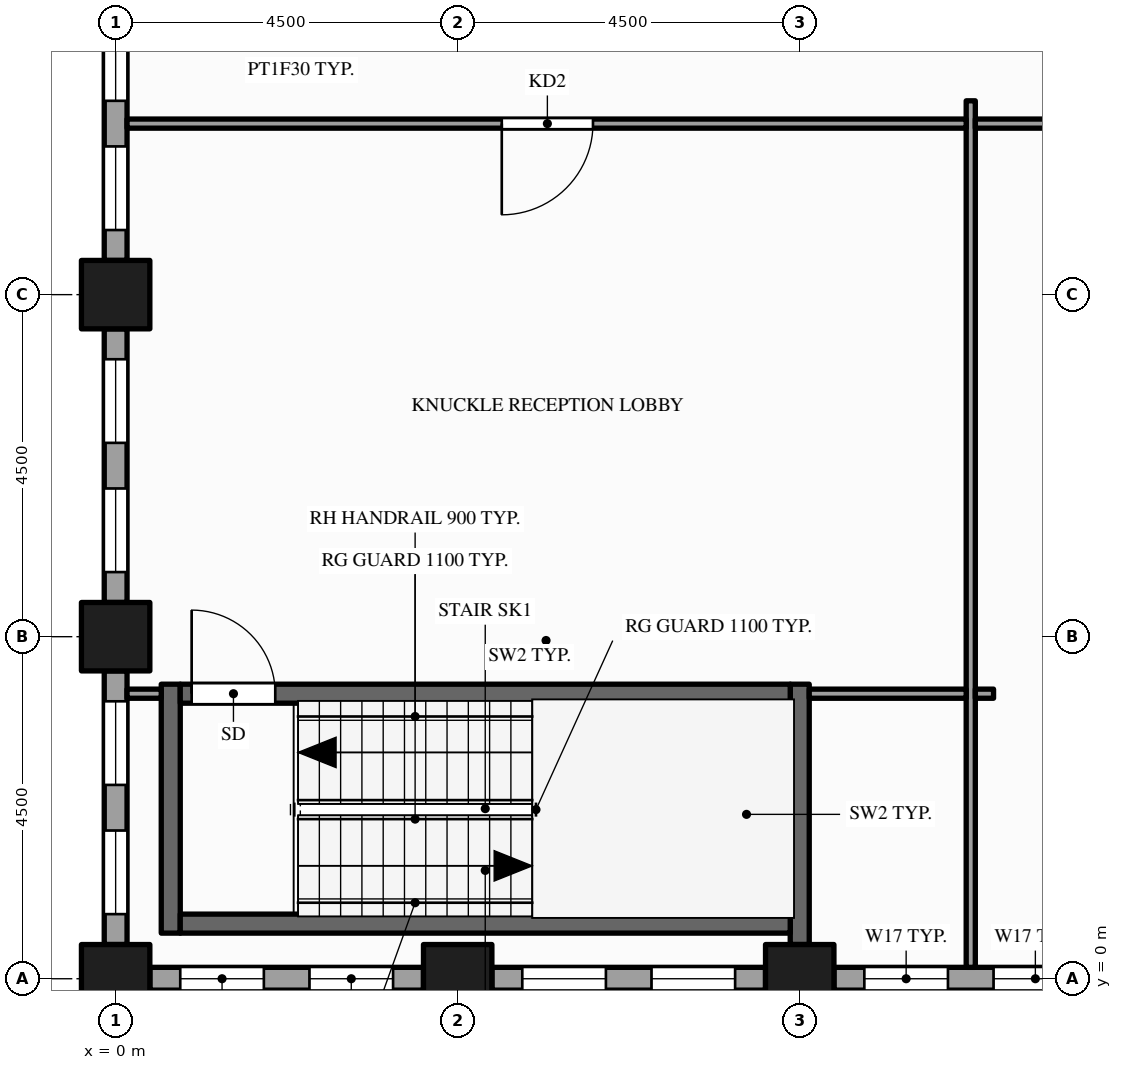
"""IFC4 building model, lengths in metres.
Left out: names, types, materials, properties, quantities, classifications, styles, units other than length and angle.
Written with IfcOpenShell. Run it as: python <this file> out.ifc"""

import sys

from ifc_helpers import new_model, si_unit, direction, frame, frame_2d, origin, origin_2d, place, context, subcontext, project, spatial, rectangle, hollow_rectangle, extrude, element, fill, save


model = new_model("IFC4")
c1 = context("Model", 3, precision=1e-05, world=origin(), true_north=direction((0.0, 1.0)))
c2 = subcontext(c1, "Body", "Model", "MODEL_VIEW")
j1 = project(units=[si_unit("LENGTHUNIT", "METRE"), si_unit("PLANEANGLEUNIT", "RADIAN")], contexts=[c1])
p1 = place(None, origin())
s1 = spatial("IfcSite", under=j1, at=p1, CompositionType="ELEMENT")
p2 = place(p1, origin())
s2 = spatial("IfcBuilding", under=s1, at=p2, CompositionType="ELEMENT")
p3 = place(p2, frame((0.0, 0.0, 171.0)))
s3 = spatial("IfcBuildingStorey", under=s2, at=p3, CompositionType="ELEMENT", Elevation=171.0)
for number, where, z_axis, x_axis in (
    (1, (0.0, 0.0, -0.15), (0.0, 0.0, 1.0), (1.0, 0.0, 0.0)),
    (2, (0.0, 4.5, -0.15), (0.0, 0.0, 1.0), (1.0, 0.0, 0.0)),
    (3, (0.0, 9.0, -0.15), (0.0, 0.0, 1.0), (1.0, 0.0, 0.0)),
    (4, (4.5, 0.0, -0.15), (0.0, 0.0, 1.0), (1.0, 0.0, 0.0)),
    (5, (9.0, 0.0, -0.15), (0.0, 0.0, 1.0), (1.0, 0.0, 0.0)),
):
    element("IfcColumn", number, at=place(p3, frame(where, z_axis=z_axis, x_axis=x_axis)), inside=s3, PredefinedType="COLUMN", context=c2, shape_type="SweptSolid", body=[
        extrude(hollow_rectangle(XDim=0.9, YDim=0.9, WallThickness=0.045, at=origin_2d()), origin(), (0.0, 0.0, 1.0), 4.0),
    ])
p4 = place(p3, frame((0.45, 0.0, 0.0), z_axis=(0.0, 0.0, 1.0), x_axis=(1.0, 0.0, 0.0)))
e6 = element("IfcWall", 6, at=p4, inside=s3, PredefinedType="STANDARD", context=c2, shape_type="SweptSolid", body=[
    extrude(rectangle(XDim=3.6, YDim=0.3, at=frame_2d((1.8, 0.0))), origin(), (0.0, 0.0, 1.0), 3.149),
])
p5 = place(p4, frame((0.4, 0.0, 0.9)))
e7 = element("IfcOpeningElement", 7, at=p5, cuts=e6, PredefinedType="OPENING", context=c2, shape_type="SweptSolid", body=[
    extrude(rectangle(XDim=1.1, YDim=2.0, at=frame_2d((0.55, 1.0))), frame((0.0, 0.16, 0.0), z_axis=(0.0, -1.0, 0.0), x_axis=(1.0, 0.0, 0.0)), (0.0, 0.0, 1.0), 0.32),
])
p6 = place(p4, frame((2.1, 0.0, 0.9)))
e8 = element("IfcOpeningElement", 8, at=p6, cuts=e6, PredefinedType="OPENING", context=c2, shape_type="SweptSolid", body=[
    extrude(rectangle(XDim=1.1, YDim=2.0, at=frame_2d((0.55, 1.0))), frame((0.0, 0.16, 0.0), z_axis=(0.0, -1.0, 0.0), x_axis=(1.0, 0.0, 0.0)), (0.0, 0.0, 1.0), 0.32),
])
p7 = place(p3, frame((4.95, 0.0, 0.0), z_axis=(0.0, 0.0, 1.0), x_axis=(1.0, 0.0, 0.0)))
e9 = element("IfcWall", 9, at=p7, inside=s3, PredefinedType="STANDARD", context=c2, shape_type="SweptSolid", body=[
    extrude(rectangle(XDim=3.6, YDim=0.3, at=frame_2d((1.8, 0.0))), origin(), (0.0, 0.0, 1.0), 3.149),
])
p8 = place(p7, frame((0.4, 0.0, 0.9)))
e10 = element("IfcOpeningElement", 10, at=p8, cuts=e9, PredefinedType="OPENING", context=c2, shape_type="SweptSolid", body=[
    extrude(rectangle(XDim=1.1, YDim=2.0, at=frame_2d((0.55, 1.0))), frame((0.0, 0.16, 0.0), z_axis=(0.0, -1.0, 0.0), x_axis=(1.0, 0.0, 0.0)), (0.0, 0.0, 1.0), 0.32),
])
p9 = place(p7, frame((2.1, 0.0, 0.9)))
e11 = element("IfcOpeningElement", 11, at=p9, cuts=e9, PredefinedType="OPENING", context=c2, shape_type="SweptSolid", body=[
    extrude(rectangle(XDim=1.1, YDim=2.0, at=frame_2d((0.55, 1.0))), frame((0.0, 0.16, 0.0), z_axis=(0.0, -1.0, 0.0), x_axis=(1.0, 0.0, 0.0)), (0.0, 0.0, 1.0), 0.32),
])
p10 = place(p3, frame((9.45, 0.0, 0.0), z_axis=(0.0, 0.0, 1.0), x_axis=(1.0, 0.0, 0.0)))
e12 = element("IfcWall", 12, at=p10, inside=s3, PredefinedType="STANDARD", context=c2, shape_type="SweptSolid", body=[
    extrude(rectangle(XDim=3.6, YDim=0.3, at=frame_2d((1.8, 0.0))), origin(), (0.0, 0.0, 1.0), 2.87),
])
p11 = place(p10, frame((0.4, 0.0, 0.9)))
e13 = element("IfcOpeningElement", 13, at=p11, cuts=e12, PredefinedType="OPENING", context=c2, shape_type="SweptSolid", body=[
    extrude(rectangle(XDim=1.1, YDim=1.75, at=frame_2d((0.55, 0.875))), frame((0.0, 0.16, 0.0), z_axis=(0.0, -1.0, 0.0), x_axis=(1.0, 0.0, 0.0)), (0.0, 0.0, 1.0), 0.32),
])
p12 = place(p10, frame((2.1, 0.0, 0.9)))
e14 = element("IfcOpeningElement", 14, at=p12, cuts=e12, PredefinedType="OPENING", context=c2, shape_type="SweptSolid", body=[
    extrude(rectangle(XDim=1.1, YDim=1.75, at=frame_2d((0.55, 0.875))), frame((0.0, 0.16, 0.0), z_axis=(0.0, -1.0, 0.0), x_axis=(1.0, 0.0, 0.0)), (0.0, 0.0, 1.0), 0.32),
])
p13 = place(p3, frame((0.0, 13.05, 0.0), z_axis=(0.0, 0.0, 1.0), x_axis=(0.0, -1.0, 0.0)))
e15 = element("IfcWall", 15, at=p13, inside=s3, PredefinedType="STANDARD", context=c2, shape_type="SweptSolid", body=[
    extrude(rectangle(XDim=3.6, YDim=0.3, at=frame_2d((1.8, 0.0))), origin(), (0.0, 0.0, 1.0), 3.149),
])
p14 = place(p13, frame((0.4, 0.0, 0.9)))
e16 = element("IfcOpeningElement", 16, at=p14, cuts=e15, PredefinedType="OPENING", context=c2, shape_type="SweptSolid", body=[
    extrude(rectangle(XDim=1.1, YDim=2.0, at=frame_2d((0.55, 1.0))), frame((0.0, 0.16, 0.0), z_axis=(0.0, -1.0, 0.0), x_axis=(1.0, 0.0, 0.0)), (0.0, 0.0, 1.0), 0.32),
])
p15 = place(p13, frame((2.1, 0.0, 0.9)))
e17 = element("IfcOpeningElement", 17, at=p15, cuts=e15, PredefinedType="OPENING", context=c2, shape_type="SweptSolid", body=[
    extrude(rectangle(XDim=1.1, YDim=2.0, at=frame_2d((0.55, 1.0))), frame((0.0, 0.16, 0.0), z_axis=(0.0, -1.0, 0.0), x_axis=(1.0, 0.0, 0.0)), (0.0, 0.0, 1.0), 0.32),
])
p16 = place(p3, frame((0.0, 8.55, 0.0), z_axis=(0.0, 0.0, 1.0), x_axis=(0.0, -1.0, 0.0)))
e18 = element("IfcWall", 18, at=p16, inside=s3, PredefinedType="STANDARD", context=c2, shape_type="SweptSolid", body=[
    extrude(rectangle(XDim=3.6, YDim=0.3, at=frame_2d((1.8, 0.0))), origin(), (0.0, 0.0, 1.0), 3.149),
])
p17 = place(p16, frame((0.4, 0.0, 0.9)))
e19 = element("IfcOpeningElement", 19, at=p17, cuts=e18, PredefinedType="OPENING", context=c2, shape_type="SweptSolid", body=[
    extrude(rectangle(XDim=1.1, YDim=2.0, at=frame_2d((0.55, 1.0))), frame((0.0, 0.16, 0.0), z_axis=(0.0, -1.0, 0.0), x_axis=(1.0, 0.0, 0.0)), (0.0, 0.0, 1.0), 0.32),
])
p18 = place(p16, frame((2.1, 0.0, 0.9)))
e20 = element("IfcOpeningElement", 20, at=p18, cuts=e18, PredefinedType="OPENING", context=c2, shape_type="SweptSolid", body=[
    extrude(rectangle(XDim=1.1, YDim=2.0, at=frame_2d((0.55, 1.0))), frame((0.0, 0.16, 0.0), z_axis=(0.0, -1.0, 0.0), x_axis=(1.0, 0.0, 0.0)), (0.0, 0.0, 1.0), 0.32),
])
p19 = place(p3, frame((0.0, 4.05, 0.0), z_axis=(0.0, 0.0, 1.0), x_axis=(0.0, -1.0, 0.0)))
e21 = element("IfcWall", 21, at=p19, inside=s3, PredefinedType="STANDARD", context=c2, shape_type="SweptSolid", body=[
    extrude(rectangle(XDim=3.6, YDim=0.3, at=frame_2d((1.8, 0.0))), origin(), (0.0, 0.0, 1.0), 3.149),
])
p20 = place(p19, frame((0.4, 0.0, 0.9)))
e22 = element("IfcOpeningElement", 22, at=p20, cuts=e21, PredefinedType="OPENING", context=c2, shape_type="SweptSolid", body=[
    extrude(rectangle(XDim=1.1, YDim=2.0, at=frame_2d((0.55, 1.0))), frame((0.0, 0.16, 0.0), z_axis=(0.0, -1.0, 0.0), x_axis=(1.0, 0.0, 0.0)), (0.0, 0.0, 1.0), 0.32),
])
p21 = place(p19, frame((2.1, 0.0, 0.9)))
e23 = element("IfcOpeningElement", 23, at=p21, cuts=e21, PredefinedType="OPENING", context=c2, shape_type="SweptSolid", body=[
    extrude(rectangle(XDim=1.1, YDim=2.0, at=frame_2d((0.55, 1.0))), frame((0.0, 0.16, 0.0), z_axis=(0.0, -1.0, 0.0), x_axis=(1.0, 0.0, 0.0)), (0.0, 0.0, 1.0), 0.32),
])
p22 = place(p3, frame((0.725, 0.6, 0.0), z_axis=(0.0, 0.0, 1.0), x_axis=(0.0, 1.0, 0.0)))
e24 = element("IfcWall", 24, at=p22, inside=s3, PredefinedType="SHEAR", context=c2, shape_type="SweptSolid", body=[
    extrude(rectangle(XDim=3.275, YDim=0.25, at=frame_2d((1.637, 0.0))), origin(), (0.0, 0.0, 1.0), 3.85),
])
p23 = place(p3, frame((9.0, 0.45, 0.0), z_axis=(0.0, 0.0, 1.0), x_axis=(0.0, 1.0, 0.0)))
e25 = element("IfcWall", 25, at=p23, inside=s3, PredefinedType="SHEAR", context=c2, shape_type="SweptSolid", body=[
    extrude(rectangle(XDim=3.425, YDim=0.25, at=frame_2d((1.712, 0.0))), origin(), (0.0, 0.0, 1.0), 3.85),
])
p24 = place(p3, frame((11.25, 0.15, 0.0), z_axis=(0.0, 0.0, 1.0), x_axis=(0.0, 1.0, 0.0)))
e26 = element("IfcWall", 26, at=p24, inside=s3, PredefinedType="PARTITIONING", context=c2, shape_type="SweptSolid", body=[
    extrude(rectangle(XDim=11.4, YDim=0.12, at=frame_2d((5.7, 0.0))), origin(), (0.0, 0.0, 1.0), 2.87),
])
p25 = place(p3, frame((0.85, 0.725, 0.0), z_axis=(0.0, 0.0, 1.0), x_axis=(1.0, 0.0, 0.0)))
e27 = element("IfcWall", 27, at=p25, inside=s3, PredefinedType="SHEAR", context=c2, shape_type="SweptSolid", body=[
    extrude(rectangle(XDim=8.025, YDim=0.25, at=frame_2d((4.012, 0.0))), origin(), (0.0, 0.0, 1.0), 3.85),
])
p26 = place(p3, frame((0.15, 3.75, 0.0), z_axis=(0.0, 0.0, 1.0), x_axis=(1.0, 0.0, 0.0)))
e28 = element("IfcWall", 28, at=p26, inside=s3, PredefinedType="PARTITIONING", context=c2, shape_type="SweptSolid", body=[
    extrude(rectangle(XDim=0.45, YDim=0.12, at=frame_2d((0.225, 0.0))), origin(), (0.0, 0.0, 1.0), 3.85),
])
p27 = place(p3, frame((0.85, 3.75, 0.0), z_axis=(0.0, 0.0, 1.0), x_axis=(1.0, 0.0, 0.0)))
e29 = element("IfcWall", 29, at=p27, inside=s3, PredefinedType="SHEAR", context=c2, shape_type="SweptSolid", body=[
    extrude(rectangle(XDim=8.025, YDim=0.25, at=frame_2d((4.012, 0.0))), origin(), (0.0, 0.0, 1.0), 3.85),
])
p28 = place(p27, frame((0.15, 0.0, 0.0)))
e30 = element("IfcOpeningElement", 30, at=p28, cuts=e29, PredefinedType="OPENING", context=c2, shape_type="SweptSolid", body=[
    extrude(rectangle(XDim=1.1, YDim=2.1, at=frame_2d((0.55, 1.05))), frame((0.0, 0.135, 0.0), z_axis=(0.0, -1.0, 0.0), x_axis=(1.0, 0.0, 0.0)), (0.0, 0.0, 1.0), 0.27),
])
p29 = place(p3, frame((9.125, 3.75, 0.0), z_axis=(0.0, 0.0, 1.0), x_axis=(1.0, 0.0, 0.0)))
e31 = element("IfcWall", 31, at=p29, inside=s3, PredefinedType="PARTITIONING", context=c2, shape_type="SweptSolid", body=[
    extrude(rectangle(XDim=2.065, YDim=0.12, at=frame_2d((1.032, 0.0))), origin(), (0.0, 0.0, 1.0), 2.87),
])
p30 = place(p3, frame((11.31, 3.75, 0.0), z_axis=(0.0, 0.0, 1.0), x_axis=(1.0, 0.0, 0.0)))
e32 = element("IfcWall", 32, at=p30, inside=s3, PredefinedType="PARTITIONING", context=c2, shape_type="SweptSolid", body=[
    extrude(rectangle(XDim=0.24, YDim=0.12, at=frame_2d((0.12, 0.0))), origin(), (0.0, 0.0, 1.0), 2.87),
])
p31 = place(p3, frame((0.15, 11.25, 0.0), z_axis=(0.0, 0.0, 1.0), x_axis=(1.0, 0.0, 0.0)))
e33 = element("IfcWall", 33, at=p31, inside=s3, PredefinedType="PARTITIONING", context=c2, shape_type="SweptSolid", body=[
    extrude(rectangle(XDim=11.04, YDim=0.12, at=frame_2d((5.52, 0.0))), origin(), (0.0, 0.0, 1.0), 2.87),
])
p32 = place(p31, frame((4.93, 0.0, 0.0)))
e34 = element("IfcOpeningElement", 34, at=p32, cuts=e33, PredefinedType="OPENING", context=c2, shape_type="SweptSolid", body=[
    extrude(rectangle(XDim=1.2, YDim=2.1, at=frame_2d((0.6, 1.05))), frame((0.0, 0.07, 0.0), z_axis=(0.0, -1.0, 0.0), x_axis=(1.0, 0.0, 0.0)), (0.0, 0.0, 1.0), 0.14),
])
p33 = place(p3, frame((11.31, 11.25, 0.0), z_axis=(0.0, 0.0, 1.0), x_axis=(1.0, 0.0, 0.0)))
e35 = element("IfcWall", 35, at=p33, inside=s3, PredefinedType="PARTITIONING", context=c2, shape_type="SweptSolid", body=[
    extrude(rectangle(XDim=4.38, YDim=0.12, at=frame_2d((2.19, 0.0))), origin(), (0.0, 0.0, 1.0), 2.87),
])
p34 = place(p33, frame((1.69, 0.0, 0.0)))
e36 = element("IfcOpeningElement", 36, at=p34, cuts=e35, PredefinedType="OPENING", context=c2, shape_type="SweptSolid", body=[
    extrude(rectangle(XDim=1.0, YDim=2.1, at=frame_2d((0.5, 1.05))), frame((0.0, 0.07, 0.0), z_axis=(0.0, -1.0, 0.0), x_axis=(1.0, 0.0, 0.0)), (0.0, 0.0, 1.0), 0.14),
])
p35 = place(p5, origin())
e37 = element("IfcWindow", 37, at=p35, inside=s3, PartitioningType="SINGLE_PANEL", PredefinedType="WINDOW", context=c2, shape_type="SweptSolid", body=[
    extrude(rectangle(XDim=1.1, YDim=2.0, at=frame_2d((0.55, 1.0))), frame((0.0, 0.03, 0.0), z_axis=(0.0, -1.0, 0.0), x_axis=(1.0, 0.0, 0.0)), (0.0, 0.0, 1.0), 0.06),
])
fill(e7, e37)
p36 = place(p6, origin())
e38 = element("IfcWindow", 38, at=p36, inside=s3, PartitioningType="SINGLE_PANEL", PredefinedType="WINDOW", context=c2, shape_type="SweptSolid", body=[
    extrude(rectangle(XDim=1.1, YDim=2.0, at=frame_2d((0.55, 1.0))), frame((0.0, 0.03, 0.0), z_axis=(0.0, -1.0, 0.0), x_axis=(1.0, 0.0, 0.0)), (0.0, 0.0, 1.0), 0.06),
])
fill(e8, e38)
p37 = place(p8, origin())
e39 = element("IfcWindow", 39, at=p37, inside=s3, PartitioningType="SINGLE_PANEL", PredefinedType="WINDOW", context=c2, shape_type="SweptSolid", body=[
    extrude(rectangle(XDim=1.1, YDim=2.0, at=frame_2d((0.55, 1.0))), frame((0.0, 0.03, 0.0), z_axis=(0.0, -1.0, 0.0), x_axis=(1.0, 0.0, 0.0)), (0.0, 0.0, 1.0), 0.06),
])
fill(e10, e39)
p38 = place(p9, origin())
e40 = element("IfcWindow", 40, at=p38, inside=s3, PartitioningType="SINGLE_PANEL", PredefinedType="WINDOW", context=c2, shape_type="SweptSolid", body=[
    extrude(rectangle(XDim=1.1, YDim=2.0, at=frame_2d((0.55, 1.0))), frame((0.0, 0.03, 0.0), z_axis=(0.0, -1.0, 0.0), x_axis=(1.0, 0.0, 0.0)), (0.0, 0.0, 1.0), 0.06),
])
fill(e11, e40)
p39 = place(p11, origin())
e41 = element("IfcWindow", 41, at=p39, inside=s3, PartitioningType="SINGLE_PANEL", PredefinedType="WINDOW", context=c2, shape_type="SweptSolid", body=[
    extrude(rectangle(XDim=1.1, YDim=1.75, at=frame_2d((0.55, 0.875))), frame((0.0, 0.03, 0.0), z_axis=(0.0, -1.0, 0.0), x_axis=(1.0, 0.0, 0.0)), (0.0, 0.0, 1.0), 0.06),
])
fill(e13, e41)
p40 = place(p12, origin())
e42 = element("IfcWindow", 42, at=p40, inside=s3, PartitioningType="SINGLE_PANEL", PredefinedType="WINDOW", context=c2, shape_type="SweptSolid", body=[
    extrude(rectangle(XDim=1.1, YDim=1.75, at=frame_2d((0.55, 0.875))), frame((0.0, 0.03, 0.0), z_axis=(0.0, -1.0, 0.0), x_axis=(1.0, 0.0, 0.0)), (0.0, 0.0, 1.0), 0.06),
])
fill(e14, e42)
p41 = place(p14, origin())
e43 = element("IfcWindow", 43, at=p41, inside=s3, PartitioningType="SINGLE_PANEL", PredefinedType="WINDOW", context=c2, shape_type="SweptSolid", body=[
    extrude(rectangle(XDim=1.1, YDim=2.0, at=frame_2d((0.55, 1.0))), frame((0.0, 0.03, 0.0), z_axis=(0.0, -1.0, 0.0), x_axis=(1.0, 0.0, 0.0)), (0.0, 0.0, 1.0), 0.06),
])
fill(e16, e43)
p42 = place(p15, origin())
e44 = element("IfcWindow", 44, at=p42, inside=s3, PartitioningType="SINGLE_PANEL", PredefinedType="WINDOW", context=c2, shape_type="SweptSolid", body=[
    extrude(rectangle(XDim=1.1, YDim=2.0, at=frame_2d((0.55, 1.0))), frame((0.0, 0.03, 0.0), z_axis=(0.0, -1.0, 0.0), x_axis=(1.0, 0.0, 0.0)), (0.0, 0.0, 1.0), 0.06),
])
fill(e17, e44)
p43 = place(p17, origin())
e45 = element("IfcWindow", 45, at=p43, inside=s3, PartitioningType="SINGLE_PANEL", PredefinedType="WINDOW", context=c2, shape_type="SweptSolid", body=[
    extrude(rectangle(XDim=1.1, YDim=2.0, at=frame_2d((0.55, 1.0))), frame((0.0, 0.03, 0.0), z_axis=(0.0, -1.0, 0.0), x_axis=(1.0, 0.0, 0.0)), (0.0, 0.0, 1.0), 0.06),
])
fill(e19, e45)
p44 = place(p18, origin())
e46 = element("IfcWindow", 46, at=p44, inside=s3, PartitioningType="SINGLE_PANEL", PredefinedType="WINDOW", context=c2, shape_type="SweptSolid", body=[
    extrude(rectangle(XDim=1.1, YDim=2.0, at=frame_2d((0.55, 1.0))), frame((0.0, 0.03, 0.0), z_axis=(0.0, -1.0, 0.0), x_axis=(1.0, 0.0, 0.0)), (0.0, 0.0, 1.0), 0.06),
])
fill(e20, e46)
p45 = place(p20, origin())
e47 = element("IfcWindow", 47, at=p45, inside=s3, PartitioningType="SINGLE_PANEL", PredefinedType="WINDOW", context=c2, shape_type="SweptSolid", body=[
    extrude(rectangle(XDim=1.1, YDim=2.0, at=frame_2d((0.55, 1.0))), frame((0.0, 0.03, 0.0), z_axis=(0.0, -1.0, 0.0), x_axis=(1.0, 0.0, 0.0)), (0.0, 0.0, 1.0), 0.06),
])
fill(e22, e47)
p46 = place(p21, origin())
e48 = element("IfcWindow", 48, at=p46, inside=s3, PartitioningType="SINGLE_PANEL", PredefinedType="WINDOW", context=c2, shape_type="SweptSolid", body=[
    extrude(rectangle(XDim=1.1, YDim=2.0, at=frame_2d((0.55, 1.0))), frame((0.0, 0.03, 0.0), z_axis=(0.0, -1.0, 0.0), x_axis=(1.0, 0.0, 0.0)), (0.0, 0.0, 1.0), 0.06),
])
fill(e23, e48)
p47 = place(p28, origin())
e49 = element("IfcDoor", 49, at=p47, inside=s3, OperationType="SINGLE_SWING_LEFT", PredefinedType="DOOR", context=c2, shape_type="SweptSolid", body=[
    extrude(rectangle(XDim=1.1, YDim=2.1, at=frame_2d((0.55, 1.05))), frame((0.0, 0.025, 0.0), z_axis=(0.0, -1.0, 0.0), x_axis=(1.0, 0.0, 0.0)), (0.0, 0.0, 1.0), 0.05),
])
fill(e30, e49)
p48 = place(p32, origin())
e50 = element("IfcDoor", 50, at=p48, inside=s3, OperationType="SINGLE_SWING_LEFT", PredefinedType="DOOR", context=c2, shape_type="SweptSolid", body=[
    extrude(rectangle(XDim=1.2, YDim=2.1, at=frame_2d((0.6, 1.05))), frame((0.0, 0.025, 0.0), z_axis=(0.0, -1.0, 0.0), x_axis=(1.0, 0.0, 0.0)), (0.0, 0.0, 1.0), 0.05),
])
fill(e34, e50)
save(model, sys.argv[1])
